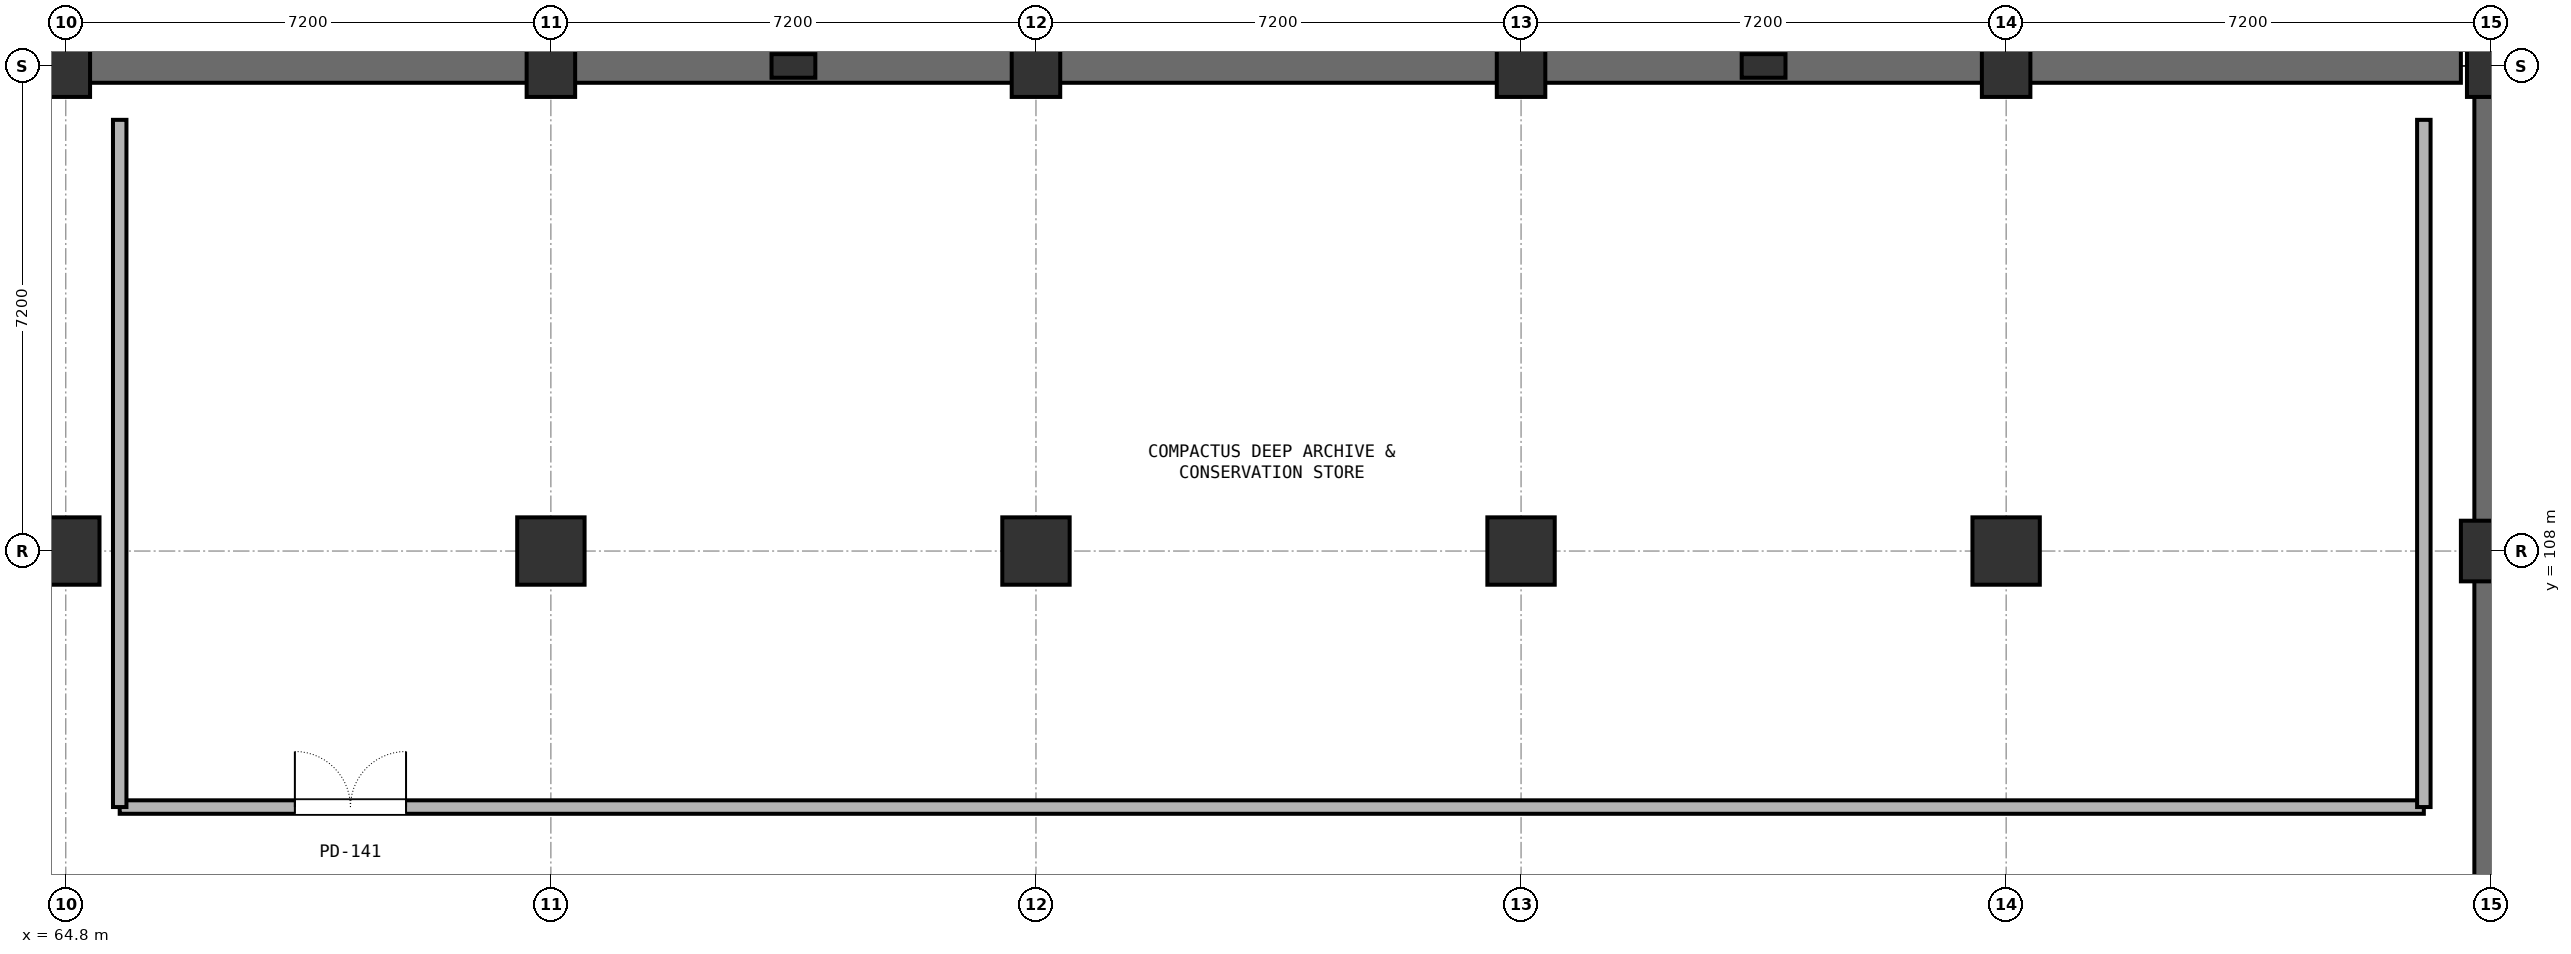
"""IFC4 building model, lengths in metres.
Left out: names, types, materials, properties, quantities, classifications, styles, units other than length and angle.
Written with IfcOpenShell. Run it as: python <this file> out.ifc"""

import sys

from ifc_helpers import new_model, si_unit, direction, frame, frame_2d, origin, origin_2d, place, context, subcontext, project, spatial, rectangle, extrude, element, fill, save


model = new_model("IFC4")
c1 = context("Model", 3, precision=1e-05, world=origin(), true_north=direction((0.0, 1.0)))
c2 = subcontext(c1, "Body", "Model", "MODEL_VIEW")
j1 = project(units=[si_unit("LENGTHUNIT", "METRE"), si_unit("PLANEANGLEUNIT", "RADIAN")], contexts=[c1])
p1 = place(None, origin())
s1 = spatial("IfcSite", under=j1, at=p1, CompositionType="ELEMENT")
p2 = place(p1, origin())
s2 = spatial("IfcBuilding", under=s1, at=p2, CompositionType="ELEMENT")
p3 = place(p2, frame((0.0, 0.0, -4.8)))
s3 = spatial("IfcBuildingStorey", under=s2, at=p3, CompositionType="ELEMENT", Elevation=-4.8)
p4 = place(p3, frame((64.8, 108.0, 0.0), z_axis=(0.0, 0.0, 1.0), x_axis=(1.0, 0.0, 0.0)))
e1 = element("IfcColumn", 1, at=p4, inside=s3, PredefinedType="COLUMN", context=c2, shape_type="SweptSolid", body=[
    extrude(rectangle(XDim=1.0, YDim=1.0, at=origin_2d()), origin(), (0.0, 0.0, 1.0), 4.8),
])
p5 = place(p3, frame((64.8, 115.2, 0.0), z_axis=(0.0, 0.0, 1.0), x_axis=(1.0, 0.0, 0.0)))
e2 = element("IfcColumn", 2, at=p5, inside=s3, PredefinedType="COLUMN", context=c2, shape_type="SweptSolid", body=[
    extrude(rectangle(XDim=0.72, YDim=0.92, at=origin_2d()), origin(), (0.0, 0.0, 1.0), 4.8),
])
p6 = place(p3, frame((72.0, 108.0, 0.0), z_axis=(0.0, 0.0, 1.0), x_axis=(1.0, 0.0, 0.0)))
e3 = element("IfcColumn", 3, at=p6, inside=s3, PredefinedType="COLUMN", context=c2, shape_type="SweptSolid", body=[
    extrude(rectangle(XDim=1.0, YDim=1.0, at=origin_2d()), origin(), (0.0, 0.0, 1.0), 4.8),
])
p7 = place(p3, frame((72.0, 115.2, 0.0), z_axis=(0.0, 0.0, 1.0), x_axis=(1.0, 0.0, 0.0)))
e4 = element("IfcColumn", 4, at=p7, inside=s3, PredefinedType="COLUMN", context=c2, shape_type="SweptSolid", body=[
    extrude(rectangle(XDim=0.72, YDim=0.92, at=origin_2d()), origin(), (0.0, 0.0, 1.0), 4.8),
])
p8 = place(p3, frame((79.2, 108.0, 0.0), z_axis=(0.0, 0.0, 1.0), x_axis=(1.0, 0.0, 0.0)))
e5 = element("IfcColumn", 5, at=p8, inside=s3, PredefinedType="COLUMN", context=c2, shape_type="SweptSolid", body=[
    extrude(rectangle(XDim=1.0, YDim=1.0, at=origin_2d()), origin(), (0.0, 0.0, 1.0), 4.8),
])
p9 = place(p3, frame((79.2, 115.2, 0.0), z_axis=(0.0, 0.0, 1.0), x_axis=(1.0, 0.0, 0.0)))
e6 = element("IfcColumn", 6, at=p9, inside=s3, PredefinedType="COLUMN", context=c2, shape_type="SweptSolid", body=[
    extrude(rectangle(XDim=0.72, YDim=0.92, at=origin_2d()), origin(), (0.0, 0.0, 1.0), 4.8),
])
p10 = place(p3, frame((86.4, 108.0, 0.0), z_axis=(0.0, 0.0, 1.0), x_axis=(1.0, 0.0, 0.0)))
e7 = element("IfcColumn", 7, at=p10, inside=s3, PredefinedType="COLUMN", context=c2, shape_type="SweptSolid", body=[
    extrude(rectangle(XDim=1.0, YDim=1.0, at=origin_2d()), origin(), (0.0, 0.0, 1.0), 4.8),
])
p11 = place(p3, frame((86.4, 115.2, 0.0), z_axis=(0.0, 0.0, 1.0), x_axis=(1.0, 0.0, 0.0)))
e8 = element("IfcColumn", 8, at=p11, inside=s3, PredefinedType="COLUMN", context=c2, shape_type="SweptSolid", body=[
    extrude(rectangle(XDim=0.72, YDim=0.92, at=origin_2d()), origin(), (0.0, 0.0, 1.0), 4.8),
])
p12 = place(p3, frame((93.6, 108.0, 0.0), z_axis=(0.0, 0.0, 1.0), x_axis=(1.0, 0.0, 0.0)))
e9 = element("IfcColumn", 9, at=p12, inside=s3, PredefinedType="COLUMN", context=c2, shape_type="SweptSolid", body=[
    extrude(rectangle(XDim=1.0, YDim=1.0, at=origin_2d()), origin(), (0.0, 0.0, 1.0), 4.8),
])
p13 = place(p3, frame((93.6, 115.2, 0.0), z_axis=(0.0, 0.0, 1.0), x_axis=(1.0, 0.0, 0.0)))
e10 = element("IfcColumn", 10, at=p13, inside=s3, PredefinedType="COLUMN", context=c2, shape_type="SweptSolid", body=[
    extrude(rectangle(XDim=0.72, YDim=0.92, at=origin_2d()), origin(), (0.0, 0.0, 1.0), 4.8),
])
p14 = place(p3, frame((100.8, 108.0, 0.0), z_axis=(0.0, 0.0, 1.0), x_axis=(1.0, 0.0, 0.0)))
e11 = element("IfcColumn", 11, at=p14, inside=s3, PredefinedType="COLUMN", context=c2, shape_type="SweptSolid", body=[
    extrude(rectangle(XDim=0.9, YDim=0.9, at=origin_2d()), origin(), (0.0, 0.0, 1.0), 4.8),
])
p15 = place(p3, frame((100.8, 115.2, 0.0), z_axis=(0.0, 0.0, 1.0), x_axis=(1.0, 0.0, 0.0)))
e12 = element("IfcColumn", 12, at=p15, inside=s3, PredefinedType="COLUMN", context=c2, shape_type="SweptSolid", body=[
    extrude(rectangle(XDim=0.72, YDim=0.92, at=origin_2d()), origin(), (0.0, 0.0, 1.0), 4.8),
])
for number, where, z_axis, x_axis in (
    (13, (75.6, 115.2, 0.0), (0.0, 0.0, 1.0), (1.0, 0.0, 0.0)),
    (14, (90.0, 115.2, 0.0), (0.0, 0.0, 1.0), (1.0, 0.0, 0.0)),
):
    element("IfcColumn", number, at=place(p3, frame(where, z_axis=z_axis, x_axis=x_axis)), inside=s3, PredefinedType="PILASTER", context=c2, shape_type="SweptSolid", body=[
        extrude(rectangle(XDim=0.65, YDim=0.35, at=origin_2d()), origin(), (0.0, 0.0, 1.0), 4.8),
    ])
p16 = place(p3, frame((36.45, 115.2, 0.0), z_axis=(0.0, 0.0, 1.0), x_axis=(1.0, 0.0, 0.0)))
e15 = element("IfcWall", 15, at=p16, inside=s3, PredefinedType="STANDARD", context=c2, shape_type="SweptSolid", body=[
    extrude(rectangle(XDim=63.9, YDim=0.5, at=frame_2d((31.95, 0.0))), origin(), (0.0, 0.0, 1.0), 4.8),
])
p17 = place(p3, frame((100.8, 114.75, 0.0), z_axis=(0.0, 0.0, 1.0), x_axis=(0.0, -1.0, 0.0)))
e16 = element("IfcWall", 16, at=p17, inside=s3, PredefinedType="STANDARD", context=c2, shape_type="SweptSolid", body=[
    extrude(rectangle(XDim=27.9, YDim=0.5, at=frame_2d((13.95, 0.0))), origin(), (0.0, 0.0, 1.0), 4.8),
])
p18 = place(p3, frame((65.6, 104.2, 0.0), z_axis=(0.0, 0.0, 1.0), x_axis=(1.0, 0.0, 0.0)))
e17 = element("IfcWall", 17, at=p18, inside=s3, PredefinedType="PARTITIONING", context=c2, shape_type="SweptSolid", body=[
    extrude(rectangle(XDim=34.2, YDim=0.2, at=frame_2d((17.1, 0.0))), origin(), (0.0, 0.0, 1.0), 3.52),
])
p19 = place(p18, frame((2.6, 0.0, 0.0)))
e18 = element("IfcOpeningElement", 18, at=p19, cuts=e17, PredefinedType="OPENING", context=c2, shape_type="SweptSolid", body=[
    extrude(rectangle(XDim=1.65, YDim=2.25, at=frame_2d((0.825, 1.125))), frame((0.0, 0.11, 0.0), z_axis=(0.0, -1.0, 0.0), x_axis=(1.0, 0.0, 0.0)), (0.0, 0.0, 1.0), 0.22),
])
for number, where, z_axis, x_axis in (
    (19, (99.8, 104.2, 0.0), (0.0, 0.0, 1.0), (0.0, 1.0, 0.0)),
    (20, (65.6, 114.4, 0.0), (0.0, 0.0, 1.0), (0.0, -1.0, 0.0)),
):
    element("IfcWall", number, at=place(p3, frame(where, z_axis=z_axis, x_axis=x_axis)), inside=s3, PredefinedType="PARTITIONING", context=c2, shape_type="SweptSolid", body=[
        extrude(rectangle(XDim=10.2, YDim=0.2, at=frame_2d((5.1, 0.0))), origin(), (0.0, 0.0, 1.0), 3.52),
    ])
p20 = place(p19, origin())
e21 = element("IfcDoor", 21, at=p20, inside=s3, OperationType="DOUBLE_DOOR_SINGLE_SWING", PredefinedType="DOOR", context=c2, shape_type="SweptSolid", body=[
    extrude(rectangle(XDim=1.65, YDim=2.25, at=frame_2d((0.825, 1.125))), frame((0.0, 0.025, 0.0), z_axis=(0.0, -1.0, 0.0), x_axis=(1.0, 0.0, 0.0)), (0.0, 0.0, 1.0), 0.05),
])
fill(e18, e21)
save(model, sys.argv[1])
